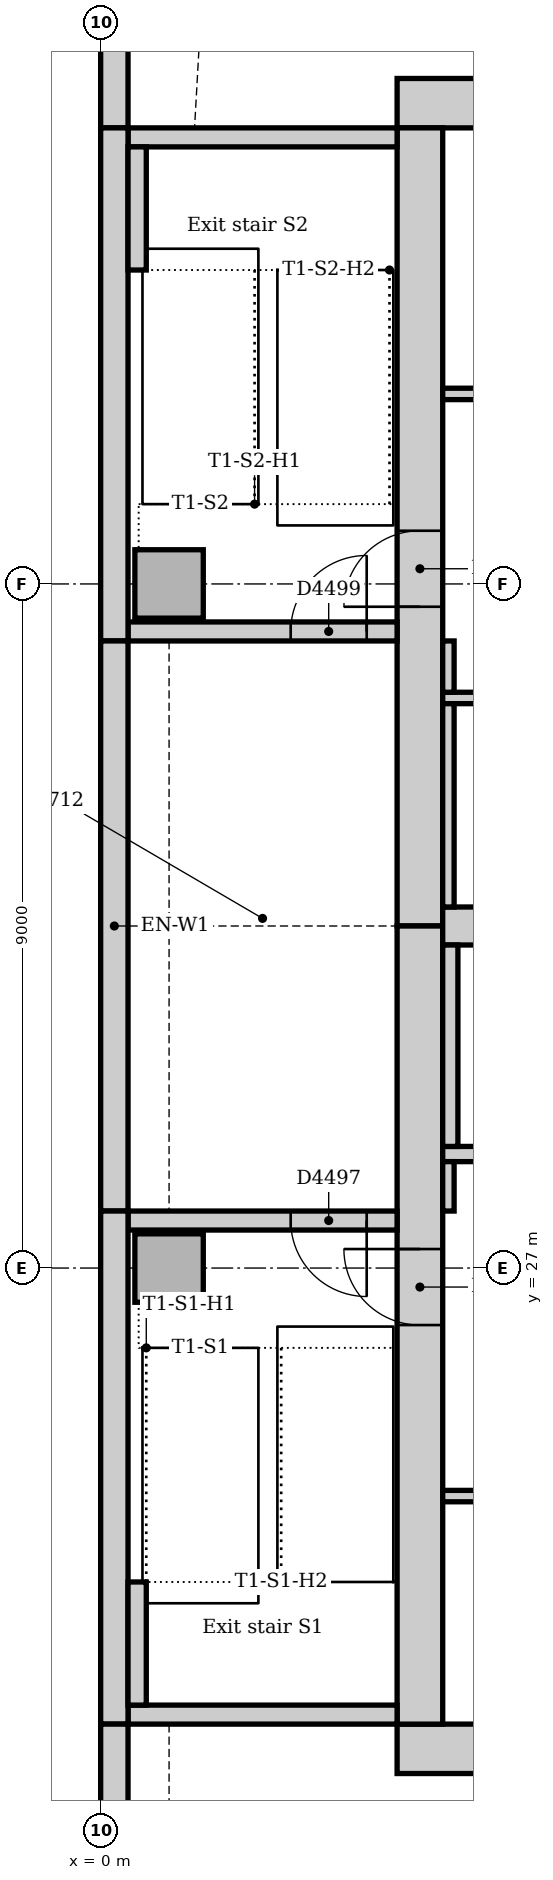
"""IFC4 building model, lengths in metres.
Left out: names, types, materials, properties, quantities, classifications, styles, units other than length and angle.
Written with IfcOpenShell. Run it as: python <this file> out.ifc"""

import sys

from ifc_helpers import new_model, si_unit, direction, frame, frame_2d, origin, origin_2d, place, context, subcontext, project, spatial, rectangle, extrude, element, fill, save


model = new_model("IFC4")
c1 = context("Model", 3, precision=1e-05, world=origin(), true_north=direction((0.0, 1.0)))
c2 = subcontext(c1, "Body", "Model", "MODEL_VIEW")
j1 = project(units=[si_unit("LENGTHUNIT", "METRE"), si_unit("PLANEANGLEUNIT", "RADIAN")], contexts=[c1])
p1 = place(None, origin())
s1 = spatial("IfcSite", under=j1, at=p1, CompositionType="ELEMENT")
p2 = place(p1, origin())
s2 = spatial("IfcBuilding", under=s1, at=p2, CompositionType="ELEMENT")
p3 = place(p2, frame((0.0, 0.0, 157.0)))
s3 = spatial("IfcBuildingStorey", under=s2, at=p3, CompositionType="ELEMENT", Elevation=157.0)
for number, where, z_axis, x_axis in (
    (1, (3.9, 20.675, 0.0), (0.0, 0.0, 1.0), (1.0, 0.0, 0.0)),
    (2, (23.15, 42.325, 0.0), (0.0, 0.0, 1.0), (-1.0, 0.0, 0.0)),
):
    element("IfcWall", number, at=place(p3, frame(where, z_axis=z_axis, x_axis=x_axis)), inside=s3, PredefinedType="SOLIDWALL", context=c2, shape_type="SweptSolid", body=[
        extrude(rectangle(XDim=19.25, YDim=0.65, at=frame_2d((9.625, 0.0))), origin(), (0.0, 0.0, 1.0), 4.0),
    ])
p4 = place(p3, frame((4.2, 42.0, 0.0), z_axis=(0.0, 0.0, 1.0), x_axis=(0.0, -1.0, 0.0)))
e3 = element("IfcWall", 3, at=p4, inside=s3, PredefinedType="SOLIDWALL", context=c2, shape_type="SweptSolid", body=[
    extrude(rectangle(XDim=10.5, YDim=0.6, at=frame_2d((5.25, 0.0))), origin(), (0.0, 0.0, 1.0), 4.0),
])
p5 = place(p4, frame((5.3, 0.0, 0.0)))
e4 = element("IfcOpeningElement", 4, at=p5, cuts=e3, PredefinedType="OPENING", context=c2, shape_type="SweptSolid", body=[
    extrude(rectangle(XDim=1.0, YDim=2.1, at=frame_2d((0.5, 1.05))), frame((0.0, 0.31, 0.0), z_axis=(0.0, -1.0, 0.0), x_axis=(1.0, 0.0, 0.0)), (0.0, 0.0, 1.0), 0.62),
])
p6 = place(p3, frame((4.2, 31.5, 0.0), z_axis=(0.0, 0.0, 1.0), x_axis=(0.0, -1.0, 0.0)))
e5 = element("IfcWall", 5, at=p6, inside=s3, PredefinedType="SOLIDWALL", context=c2, shape_type="SweptSolid", body=[
    extrude(rectangle(XDim=10.5, YDim=0.6, at=frame_2d((5.25, 0.0))), origin(), (0.0, 0.0, 1.0), 4.0),
])
p7 = place(p6, frame((4.25, 0.0, 0.0)))
e6 = element("IfcOpeningElement", 6, at=p7, cuts=e5, PredefinedType="OPENING", context=c2, shape_type="SweptSolid", body=[
    extrude(rectangle(XDim=1.0, YDim=2.1, at=frame_2d((0.5, 1.05))), frame((0.0, 0.31, 0.0), z_axis=(0.0, -1.0, 0.0), x_axis=(1.0, 0.0, 0.0)), (0.0, 0.0, 1.0), 0.62),
])
p8 = place(p3, frame((4.5, 31.5, 0.0), z_axis=(0.0, 0.0, 1.0), x_axis=(1.0, 0.0, 0.0)))
e7 = element("IfcWall", 7, at=p8, inside=s3, PredefinedType="SOLIDWALL", context=c2, shape_type="SweptSolid", body=[
    extrude(rectangle(XDim=18.0, YDim=0.5, at=frame_2d((9.0, 0.0))), origin(), (0.0, 0.0, 1.0), 4.0),
])
p9 = place(p3, frame((0.36, 21.125, 0.0), z_axis=(0.0, 0.0, 1.0), x_axis=(1.0, 0.0, 0.0)))
e8 = element("IfcWall", 8, at=p9, inside=s3, PredefinedType="SOLIDWALL", context=c2, shape_type="SweptSolid", body=[
    extrude(rectangle(XDim=3.54, YDim=0.25, at=frame_2d((1.77, 0.0))), origin(), (0.0, 0.0, 1.0), 4.0),
])
p10 = place(p3, frame((3.9, 27.625, 0.0), z_axis=(0.0, 0.0, 1.0), x_axis=(-1.0, 0.0, 0.0)))
e9 = element("IfcWall", 9, at=p10, inside=s3, PredefinedType="SOLIDWALL", context=c2, shape_type="SweptSolid", body=[
    extrude(rectangle(XDim=3.54, YDim=0.25, at=frame_2d((1.77, 0.0))), origin(), (0.0, 0.0, 1.0), 4.0),
])
p11 = place(p10, frame((0.4, 0.0, 0.0)))
e10 = element("IfcOpeningElement", 10, at=p11, cuts=e9, PredefinedType="OPENING", context=c2, shape_type="SweptSolid", body=[
    extrude(rectangle(XDim=1.0, YDim=2.1, at=frame_2d((0.5, 1.05))), frame((0.0, 0.135, 0.0), z_axis=(0.0, -1.0, 0.0), x_axis=(1.0, 0.0, 0.0)), (0.0, 0.0, 1.0), 0.27),
])
p12 = place(p3, frame((0.36, 35.375, 0.0), z_axis=(0.0, 0.0, 1.0), x_axis=(1.0, 0.0, 0.0)))
e11 = element("IfcWall", 11, at=p12, inside=s3, PredefinedType="SOLIDWALL", context=c2, shape_type="SweptSolid", body=[
    extrude(rectangle(XDim=3.54, YDim=0.25, at=frame_2d((1.77, 0.0))), origin(), (0.0, 0.0, 1.0), 4.0),
])
p13 = place(p12, frame((2.14, 0.0, 0.0)))
e12 = element("IfcOpeningElement", 12, at=p13, cuts=e11, PredefinedType="OPENING", context=c2, shape_type="SweptSolid", body=[
    extrude(rectangle(XDim=1.0, YDim=2.1, at=frame_2d((0.5, 1.05))), frame((0.0, 0.135, 0.0), z_axis=(0.0, -1.0, 0.0), x_axis=(1.0, 0.0, 0.0)), (0.0, 0.0, 1.0), 0.27),
])
p14 = place(p3, frame((3.9, 41.875, 0.0), z_axis=(0.0, 0.0, 1.0), x_axis=(-1.0, 0.0, 0.0)))
e13 = element("IfcWall", 13, at=p14, inside=s3, PredefinedType="SOLIDWALL", context=c2, shape_type="SweptSolid", body=[
    extrude(rectangle(XDim=3.54, YDim=0.25, at=frame_2d((1.77, 0.0))), origin(), (0.0, 0.0, 1.0), 4.0),
])
for number, where, z_axis, x_axis in (
    (14, (0.9, 27.0, 0.0), (0.0, 0.0, 1.0), (1.0, 0.0, 0.0)),
    (15, (0.9, 36.0, 0.0), (0.0, 0.0, 1.0), (1.0, 0.0, 0.0)),
):
    element("IfcColumn", number, at=place(p3, frame(where, z_axis=z_axis, x_axis=x_axis)), inside=s3, PredefinedType="COLUMN", context=c2, shape_type="SweptSolid", body=[
        extrude(rectangle(XDim=0.9, YDim=0.9, at=origin_2d()), origin(), (0.0, 0.0, 1.0), 4.0),
    ])
p15 = place(p3, frame((0.18, 49.757, 0.0), z_axis=(0.0, 0.0, 1.0), x_axis=(0.0, -1.0, 0.0)))
e16 = element("IfcWall", 16, at=p15, inside=s3, PredefinedType="STANDARD", context=c2, shape_type="SweptSolid", body=[
    extrude(rectangle(XDim=7.757, YDim=0.36, at=frame_2d((3.879, 0.0))), origin(), (0.0, 0.0, 1.0), 3.85),
])
p16 = place(p15, frame((3.107, 0.0, 0.9)))
e17 = element("IfcOpeningElement", 17, at=p16, cuts=e16, PredefinedType="OPENING", context=c2, shape_type="SweptSolid", body=[
    extrude(rectangle(XDim=3.3, YDim=1.6, at=frame_2d((1.65, 0.8))), frame((0.0, 0.19, 0.0), z_axis=(0.0, -1.0, 0.0), x_axis=(1.0, 0.0, 0.0)), (0.0, 0.0, 1.0), 0.38),
])
p17 = place(p3, frame((0.18, 42.0, 0.0), z_axis=(0.0, 0.0, 1.0), x_axis=(0.0, -1.0, 0.0)))
e18 = element("IfcWall", 18, at=p17, inside=s3, PredefinedType="STANDARD", context=c2, shape_type="SweptSolid", body=[
    extrude(rectangle(XDim=6.75, YDim=0.36, at=frame_2d((3.375, 0.0))), origin(), (0.0, 0.0, 1.0), 3.85),
])
p18 = place(p3, frame((0.18, 35.25, 0.0), z_axis=(0.0, 0.0, 1.0), x_axis=(0.0, -1.0, 0.0)))
e19 = element("IfcWall", 19, at=p18, inside=s3, PredefinedType="STANDARD", context=c2, shape_type="SweptSolid", body=[
    extrude(rectangle(XDim=7.5, YDim=0.36, at=frame_2d((3.75, 0.0))), origin(), (0.0, 0.0, 1.0), 3.85),
])
p19 = place(p3, frame((0.18, 27.75, 0.0), z_axis=(0.0, 0.0, 1.0), x_axis=(0.0, -1.0, 0.0)))
e20 = element("IfcWall", 20, at=p19, inside=s3, PredefinedType="STANDARD", context=c2, shape_type="SweptSolid", body=[
    extrude(rectangle(XDim=6.75, YDim=0.36, at=frame_2d((3.375, 0.0))), origin(), (0.0, 0.0, 1.0), 3.85),
])
p20 = place(p3, frame((0.18, 21.0, 0.0), z_axis=(0.0, 0.0, 1.0), x_axis=(0.0, -1.0, 0.0)))
e21 = element("IfcWall", 21, at=p20, inside=s3, PredefinedType="STANDARD", context=c2, shape_type="SweptSolid", body=[
    extrude(rectangle(XDim=7.757, YDim=0.36, at=frame_2d((3.879, 0.0))), origin(), (0.0, 0.0, 1.0), 3.85),
])
p21 = place(p20, frame((1.35, 0.0, 0.9)))
e22 = element("IfcOpeningElement", 22, at=p21, cuts=e21, PredefinedType="OPENING", context=c2, shape_type="SweptSolid", body=[
    extrude(rectangle(XDim=3.3, YDim=1.6, at=frame_2d((1.65, 0.8))), frame((0.0, 0.19, 0.0), z_axis=(0.0, -1.0, 0.0), x_axis=(1.0, 0.0, 0.0)), (0.0, 0.0, 1.0), 0.38),
])
for number, where, z_axis, x_axis in (
    (23, (0.48, 21.25, 0.0), (0.0, 0.0, 1.0), (0.0, 1.0, 0.0)),
    (24, (0.48, 40.13, 0.0), (0.0, 0.0, 1.0), (0.0, 1.0, 0.0)),
):
    element("IfcWall", number, at=place(p3, frame(where, z_axis=z_axis, x_axis=x_axis)), inside=s3, PredefinedType="STANDARD", context=c2, shape_type="SweptSolid", body=[
        extrude(rectangle(XDim=1.62, YDim=0.24, at=frame_2d((0.81, 0.0))), origin(), (0.0, 0.0, 1.0), 4.0),
    ])
p22 = place(p3, frame((4.5, 28.5, 0.0), z_axis=(0.0, 0.0, 1.0), x_axis=(1.0, 0.0, 0.0)))
e25 = element("IfcWall", 25, at=p22, inside=s3, PredefinedType="PARTITIONING", context=c2, shape_type="SweptSolid", body=[
    extrude(rectangle(XDim=18.0, YDim=0.2, at=frame_2d((9.0, 0.0))), origin(), (0.0, 0.0, 1.0), 3.85),
])
p23 = place(p22, frame((0.95, 0.0, 0.0)))
e26 = element("IfcOpeningElement", 26, at=p23, cuts=e25, PredefinedType="OPENING", context=c2, shape_type="SweptSolid", body=[
    extrude(rectangle(XDim=1.1, YDim=2.1, at=frame_2d((0.55, 1.05))), frame((0.0, 0.11, 0.0), z_axis=(0.0, -1.0, 0.0), x_axis=(1.0, 0.0, 0.0)), (0.0, 0.0, 1.0), 0.22),
])
p24 = place(p22, frame((3.95, 0.0, 0.0)))
e27 = element("IfcOpeningElement", 27, at=p24, cuts=e25, PredefinedType="OPENING", context=c2, shape_type="SweptSolid", body=[
    extrude(rectangle(XDim=1.1, YDim=2.1, at=frame_2d((0.55, 1.05))), frame((0.0, 0.11, 0.0), z_axis=(0.0, -1.0, 0.0), x_axis=(1.0, 0.0, 0.0)), (0.0, 0.0, 1.0), 0.22),
])
p25 = place(p22, frame((6.95, 0.0, 0.0)))
e28 = element("IfcOpeningElement", 28, at=p25, cuts=e25, PredefinedType="OPENING", context=c2, shape_type="SweptSolid", body=[
    extrude(rectangle(XDim=1.1, YDim=2.1, at=frame_2d((0.55, 1.05))), frame((0.0, 0.11, 0.0), z_axis=(0.0, -1.0, 0.0), x_axis=(1.0, 0.0, 0.0)), (0.0, 0.0, 1.0), 0.22),
])
p26 = place(p22, frame((9.95, 0.0, 0.0)))
e29 = element("IfcOpeningElement", 29, at=p26, cuts=e25, PredefinedType="OPENING", context=c2, shape_type="SweptSolid", body=[
    extrude(rectangle(XDim=1.1, YDim=2.1, at=frame_2d((0.55, 1.05))), frame((0.0, 0.11, 0.0), z_axis=(0.0, -1.0, 0.0), x_axis=(1.0, 0.0, 0.0)), (0.0, 0.0, 1.0), 0.22),
])
p27 = place(p22, frame((12.95, 0.0, 0.0)))
e30 = element("IfcOpeningElement", 30, at=p27, cuts=e25, PredefinedType="OPENING", context=c2, shape_type="SweptSolid", body=[
    extrude(rectangle(XDim=1.1, YDim=2.1, at=frame_2d((0.55, 1.05))), frame((0.0, 0.11, 0.0), z_axis=(0.0, -1.0, 0.0), x_axis=(1.0, 0.0, 0.0)), (0.0, 0.0, 1.0), 0.22),
])
p28 = place(p22, frame((15.95, 0.0, 0.0)))
e31 = element("IfcOpeningElement", 31, at=p28, cuts=e25, PredefinedType="OPENING", context=c2, shape_type="SweptSolid", body=[
    extrude(rectangle(XDim=1.1, YDim=2.1, at=frame_2d((0.55, 1.05))), frame((0.0, 0.11, 0.0), z_axis=(0.0, -1.0, 0.0), x_axis=(1.0, 0.0, 0.0)), (0.0, 0.0, 1.0), 0.22),
])
p29 = place(p3, frame((4.6, 28.6, 0.0), z_axis=(0.0, 0.0, 1.0), x_axis=(0.0, 1.0, 0.0)))
e32 = element("IfcWall", 32, at=p29, inside=s3, PredefinedType="PARTITIONING", context=c2, shape_type="SweptSolid", body=[
    extrude(rectangle(XDim=2.65, YDim=0.2, at=frame_2d((1.325, 0.0))), origin(), (0.0, 0.0, 1.0), 3.85),
])
p30 = place(p3, frame((4.5, 24.0, 0.0), z_axis=(0.0, 0.0, 1.0), x_axis=(1.0, 0.0, 0.0)))
e33 = element("IfcWall", 33, at=p30, inside=s3, PredefinedType="PARTITIONING", context=c2, shape_type="SweptSolid", body=[
    extrude(rectangle(XDim=18.0, YDim=0.15, at=frame_2d((9.0, 0.0))), origin(), (0.0, 0.0, 1.0), 3.85),
])
p31 = place(p30, frame((2.6, 0.0, 0.0)))
e34 = element("IfcOpeningElement", 34, at=p31, cuts=e33, PredefinedType="OPENING", context=c2, shape_type="SweptSolid", body=[
    extrude(rectangle(XDim=0.9, YDim=2.1, at=frame_2d((0.45, 1.05))), frame((0.0, 0.085, 0.0), z_axis=(0.0, -1.0, 0.0), x_axis=(1.0, 0.0, 0.0)), (0.0, 0.0, 1.0), 0.17),
])
p32 = place(p30, frame((8.55, 0.0, 0.0)))
e35 = element("IfcOpeningElement", 35, at=p32, cuts=e33, PredefinedType="OPENING", context=c2, shape_type="SweptSolid", body=[
    extrude(rectangle(XDim=0.9, YDim=2.1, at=frame_2d((0.45, 1.05))), frame((0.0, 0.085, 0.0), z_axis=(0.0, -1.0, 0.0), x_axis=(1.0, 0.0, 0.0)), (0.0, 0.0, 1.0), 0.17),
])
p33 = place(p30, frame((14.45, 0.0, 0.0)))
e36 = element("IfcOpeningElement", 36, at=p33, cuts=e33, PredefinedType="OPENING", context=c2, shape_type="SweptSolid", body=[
    extrude(rectangle(XDim=0.9, YDim=2.1, at=frame_2d((0.45, 1.05))), frame((0.0, 0.085, 0.0), z_axis=(0.0, -1.0, 0.0), x_axis=(1.0, 0.0, 0.0)), (0.0, 0.0, 1.0), 0.17),
])
p34 = place(p3, frame((4.5, 38.5, 0.0), z_axis=(0.0, 0.0, 1.0), x_axis=(1.0, 0.0, 0.0)))
e37 = element("IfcWall", 37, at=p34, inside=s3, PredefinedType="PARTITIONING", context=c2, shape_type="SweptSolid", body=[
    extrude(rectangle(XDim=11.9, YDim=0.15, at=frame_2d((5.95, 0.0))), origin(), (0.0, 0.0, 1.0), 3.85),
])
p35 = place(p34, frame((1.85, 0.0, 0.0)))
e38 = element("IfcOpeningElement", 38, at=p35, cuts=e37, PredefinedType="OPENING", context=c2, shape_type="SweptSolid", body=[
    extrude(rectangle(XDim=0.9, YDim=2.1, at=frame_2d((0.45, 1.05))), frame((0.0, 0.085, 0.0), z_axis=(0.0, -1.0, 0.0), x_axis=(1.0, 0.0, 0.0)), (0.0, 0.0, 1.0), 0.17),
])
p36 = place(p34, frame((5.55, 0.0, 0.0)))
e39 = element("IfcOpeningElement", 39, at=p36, cuts=e37, PredefinedType="OPENING", context=c2, shape_type="SweptSolid", body=[
    extrude(rectangle(XDim=0.9, YDim=2.1, at=frame_2d((0.45, 1.05))), frame((0.0, 0.085, 0.0), z_axis=(0.0, -1.0, 0.0), x_axis=(1.0, 0.0, 0.0)), (0.0, 0.0, 1.0), 0.17),
])
p37 = place(p34, frame((7.8, 0.0, 0.0)))
e40 = element("IfcOpeningElement", 40, at=p37, cuts=e37, PredefinedType="OPENING", context=c2, shape_type="SweptSolid", body=[
    extrude(rectangle(XDim=0.9, YDim=2.1, at=frame_2d((0.45, 1.05))), frame((0.0, 0.085, 0.0), z_axis=(0.0, -1.0, 0.0), x_axis=(1.0, 0.0, 0.0)), (0.0, 0.0, 1.0), 0.17),
])
p38 = place(p34, frame((9.95, 0.0, 0.0)))
e41 = element("IfcOpeningElement", 41, at=p38, cuts=e37, PredefinedType="OPENING", context=c2, shape_type="SweptSolid", body=[
    extrude(rectangle(XDim=0.8, YDim=2.1, at=frame_2d((0.4, 1.05))), frame((0.0, 0.085, 0.0), z_axis=(0.0, -1.0, 0.0), x_axis=(1.0, 0.0, 0.0)), (0.0, 0.0, 1.0), 0.17),
])
p39 = place(p3, frame((4.5, 34.5, 0.0), z_axis=(0.0, 0.0, 1.0), x_axis=(1.0, 0.0, 0.0)))
e42 = element("IfcWall", 42, at=p39, inside=s3, PredefinedType="PARTITIONING", context=c2, shape_type="SweptSolid", body=[
    extrude(rectangle(XDim=5.9, YDim=0.15, at=frame_2d((2.95, 0.0))), origin(), (0.0, 0.0, 1.0), 3.85),
])
p40 = place(p39, frame((2.5, 0.0, 0.0)))
e43 = element("IfcOpeningElement", 43, at=p40, cuts=e42, PredefinedType="OPENING", context=c2, shape_type="SweptSolid", body=[
    extrude(rectangle(XDim=0.9, YDim=2.1, at=frame_2d((0.45, 1.05))), frame((0.0, 0.085, 0.0), z_axis=(0.0, -1.0, 0.0), x_axis=(1.0, 0.0, 0.0)), (0.0, 0.0, 1.0), 0.17),
])
p41 = place(p3, frame((4.575, 34.575, 0.0), z_axis=(0.0, 0.0, 1.0), x_axis=(0.0, 1.0, 0.0)))
e44 = element("IfcWall", 44, at=p41, inside=s3, PredefinedType="PARTITIONING", context=c2, shape_type="SweptSolid", body=[
    extrude(rectangle(XDim=0.675, YDim=0.15, at=frame_2d((0.338, 0.0))), origin(), (0.0, 0.0, 1.0), 3.85),
])
p42 = place(p3, frame((4.575, 31.75, 0.0), z_axis=(0.0, 0.0, 1.0), x_axis=(0.0, 1.0, 0.0)))
e45 = element("IfcWall", 45, at=p42, inside=s3, PredefinedType="PARTITIONING", context=c2, shape_type="SweptSolid", body=[
    extrude(rectangle(XDim=2.675, YDim=0.15, at=frame_2d((1.337, 0.0))), origin(), (0.0, 0.0, 1.0), 3.85),
])
p43 = place(p3, frame((4.575, 27.75, 0.0), z_axis=(0.0, 0.0, 1.0), x_axis=(0.0, 1.0, 0.0)))
e46 = element("IfcWall", 46, at=p43, inside=s3, PredefinedType="PARTITIONING", context=c2, shape_type="SweptSolid", body=[
    extrude(rectangle(XDim=0.65, YDim=0.15, at=frame_2d((0.325, 0.0))), origin(), (0.0, 0.0, 1.0), 3.85),
])
p44 = place(p7, frame((1.0, 0.0, 0.0), z_axis=(0.0, 0.0, 1.0), x_axis=(-1.0, 0.0, 0.0)))
e47 = element("IfcDoor", 47, at=p44, inside=s3, OperationType="SINGLE_SWING_RIGHT", PredefinedType="DOOR", context=c2, shape_type="SweptSolid", body=[
    extrude(rectangle(XDim=1.0, YDim=2.1, at=frame_2d((0.5, 1.05))), frame((0.0, 0.025, 0.0), z_axis=(0.0, -1.0, 0.0), x_axis=(1.0, 0.0, 0.0)), (0.0, 0.0, 1.0), 0.05),
])
fill(e6, e47)
p45 = place(p11, origin())
e48 = element("IfcDoor", 48, at=p45, inside=s3, OperationType="SINGLE_SWING_LEFT", PredefinedType="DOOR", context=c2, shape_type="SweptSolid", body=[
    extrude(rectangle(XDim=1.0, YDim=2.1, at=frame_2d((0.5, 1.05))), frame((0.0, 0.025, 0.0), z_axis=(0.0, -1.0, 0.0), x_axis=(1.0, 0.0, 0.0)), (0.0, 0.0, 1.0), 0.05),
])
fill(e10, e48)
p46 = place(p5, frame((1.0, 0.0, 0.0), z_axis=(0.0, 0.0, 1.0), x_axis=(-1.0, 0.0, 0.0)))
e49 = element("IfcDoor", 49, at=p46, inside=s3, OperationType="SINGLE_SWING_LEFT", PredefinedType="DOOR", context=c2, shape_type="SweptSolid", body=[
    extrude(rectangle(XDim=1.0, YDim=2.1, at=frame_2d((0.5, 1.05))), frame((0.0, 0.025, 0.0), z_axis=(0.0, -1.0, 0.0), x_axis=(1.0, 0.0, 0.0)), (0.0, 0.0, 1.0), 0.05),
])
fill(e4, e49)
p47 = place(p13, origin())
e50 = element("IfcDoor", 50, at=p47, inside=s3, OperationType="SINGLE_SWING_RIGHT", PredefinedType="DOOR", context=c2, shape_type="SweptSolid", body=[
    extrude(rectangle(XDim=1.0, YDim=2.1, at=frame_2d((0.5, 1.05))), frame((0.0, 0.025, 0.0), z_axis=(0.0, -1.0, 0.0), x_axis=(1.0, 0.0, 0.0)), (0.0, 0.0, 1.0), 0.05),
])
fill(e12, e50)
save(model, sys.argv[1])
